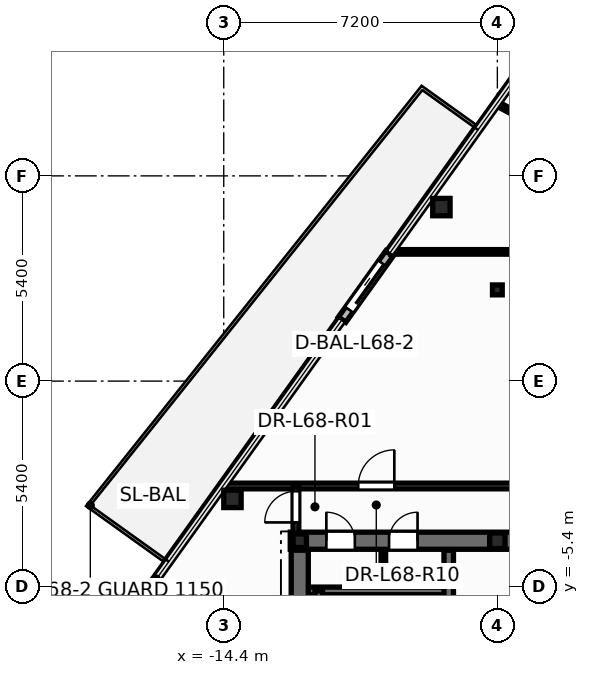
"""IFC4 building model, lengths in metres.
Left out: names, types, materials, properties, quantities, classifications, styles, units other than length and angle.
Written with IfcOpenShell. Run it as: python <this file> out.ifc"""

import sys

from ifc_helpers import new_model, si_unit, direction, frame, frame_2d, origin, origin_2d, place, context, subcontext, project, spatial, rectangle, hollow_circle, i_section, extrude, element, fill, save


model = new_model("IFC4")
c1 = context("Model", 3, precision=1e-05, world=origin(), true_north=direction((0.0, 1.0)))
c2 = subcontext(c1, "Body", "Model", "MODEL_VIEW")
j1 = project(units=[si_unit("LENGTHUNIT", "METRE"), si_unit("PLANEANGLEUNIT", "RADIAN")], contexts=[c1])
p1 = place(None, origin())
s1 = spatial("IfcSite", under=j1, at=p1, CompositionType="ELEMENT")
p2 = place(p1, origin())
s2 = spatial("IfcBuilding", under=s1, at=p2, CompositionType="ELEMENT")
p3 = place(p2, frame((0.0, 0.0, 259.8)))
s3 = spatial("IfcBuildingStorey", under=s2, at=p3, CompositionType="ELEMENT", Elevation=259.8)
for number, where, z_axis, x_axis in (
    (1, (-8.673, 4.579, 0.0), (0.0, 0.0, 1.0), (1.0, 0.0, 0.0)),
    (2, (-14.171, -3.099, 0.0), (0.0, 0.0, 1.0), (1.0, 0.0, 0.0)),
):
    element("IfcColumn", number, at=place(p3, frame(where, z_axis=z_axis, x_axis=x_axis)), inside=s3, PredefinedType="COLUMN", context=c2, shape_type="SweptSolid", body=[
        extrude(hollow_circle(Radius=0.229, WallThickness=0.016, at=origin_2d()), origin(), (0.0, 0.0, 1.0), 3.6),
    ])
p4 = place(p3, frame((-12.4, -4.2, 0.0), z_axis=(0.0, 0.0, 1.0), x_axis=(1.0, 0.0, 0.0)))
e3 = element("IfcColumn", 3, at=p4, inside=s3, PredefinedType="COLUMN", context=c2, shape_type="SweptSolid", body=[
    extrude(i_section(OverallWidth=0.352, OverallDepth=0.359, WebThickness=0.018, FlangeThickness=0.026, at=origin_2d()), origin(), (0.0, 0.0, 1.0), 3.6),
])
p5 = place(p3, frame((-7.2, -4.2, 0.0), z_axis=(0.0, 0.0, 1.0), x_axis=(1.0, 0.0, 0.0)))
e4 = element("IfcColumn", 4, at=p5, inside=s3, PredefinedType="PILASTER", context=c2, shape_type="SweptSolid", body=[
    extrude(i_section(OverallWidth=0.405, OverallDepth=0.414, WebThickness=0.022, FlangeThickness=0.032, at=origin_2d()), origin(), (0.0, 0.0, 1.0), 3.6),
])
p6 = place(p3, frame((-7.2, 2.4, 0.0), z_axis=(0.0, 0.0, 1.0), x_axis=(1.0, 0.0, 0.0)))
e5 = element("IfcColumn", 5, at=p6, inside=s3, PredefinedType="COLUMN", context=c2, shape_type="SweptSolid", body=[
    extrude(i_section(OverallWidth=0.256, OverallDepth=0.26, WebThickness=0.01, FlangeThickness=0.017, at=origin_2d()), origin(), (0.0, 0.0, 1.0), 3.6),
])
p7 = place(p3, frame((-10.039, 3.357, -0.015), z_axis=(0.0, 0.0, 1.0), x_axis=(-0.58216589686, -0.813070026832, 0.0)))
e6 = element("IfcWall", 6, at=p7, inside=s3, PredefinedType="STANDARD", context=c2, shape_type="SweptSolid", body=[
    extrude(rectangle(XDim=2.14, YDim=0.24, at=frame_2d((1.07, 0.0))), origin(), (0.0, 0.0, 1.0), 2.878),
])
p8 = place(p7, frame((0.32, 0.0, 0.015)))
e7 = element("IfcOpeningElement", 7, at=p8, cuts=e6, PredefinedType="OPENING", context=c2, shape_type="SweptSolid", body=[
    extrude(rectangle(XDim=1.506, YDim=2.204, at=frame_2d((0.75, 1.102))), frame((0.0, 0.13, 0.0), z_axis=(0.0, -1.0, 0.0), x_axis=(1.0, 0.0, 0.0)), (0.0, 0.0, 1.0), 0.26),
])
p9 = place(p3, frame((-10.2, -5.52, 0.0), z_axis=(0.0, 0.0, 1.0), x_axis=(0.0, 1.0, 0.0)))
e8 = element("IfcWall", 8, at=p9, inside=s3, PredefinedType="PARTITIONING", context=c2, shape_type="SweptSolid", body=[
    extrude(rectangle(XDim=1.12, YDim=0.12, at=frame_2d((0.56, 0.0))), origin(), (0.0, 0.0, 1.0), 3.345),
])
p10 = place(p3, frame((-12.65, -4.2, 0.0), z_axis=(0.0, 0.0, 1.0), x_axis=(1.0, 0.0, 0.0)))
e9 = element("IfcWall", 9, at=p10, inside=s3, PredefinedType="SHEAR", context=c2, shape_type="SweptSolid", body=[
    extrude(rectangle(XDim=25.3, YDim=0.45, at=frame_2d((12.65, 0.0))), origin(), (0.0, 0.0, 1.0), 3.6),
])
p11 = place(p10, frame((0.95, 0.0, 0.0)))
e10 = element("IfcOpeningElement", 10, at=p11, cuts=e9, PredefinedType="OPENING", context=c2, shape_type="SweptSolid", body=[
    extrude(rectangle(XDim=0.756, YDim=2.054, at=frame_2d((0.375, 1.027))), frame((0.0, 0.235, 0.0), z_axis=(0.0, -1.0, 0.0), x_axis=(1.0, 0.0, 0.0)), (0.0, 0.0, 1.0), 0.47),
])
p12 = place(p10, frame((2.6, 0.0, 0.0)))
e11 = element("IfcOpeningElement", 11, at=p12, cuts=e9, PredefinedType="OPENING", context=c2, shape_type="SweptSolid", body=[
    extrude(rectangle(XDim=0.756, YDim=2.054, at=frame_2d((0.375, 1.027))), frame((0.0, 0.235, 0.0), z_axis=(0.0, -1.0, 0.0), x_axis=(1.0, 0.0, 0.0)), (0.0, 0.0, 1.0), 0.47),
])
p13 = place(p10, frame((21.85, 0.0, 0.0)))
e12 = element("IfcOpeningElement", 12, at=p13, cuts=e9, PredefinedType="OPENING", context=c2, shape_type="SweptSolid", body=[
    extrude(rectangle(XDim=0.756, YDim=2.054, at=frame_2d((0.375, 1.027))), frame((0.0, 0.235, 0.0), z_axis=(0.0, -1.0, 0.0), x_axis=(1.0, 0.0, 0.0)), (0.0, 0.0, 1.0), 0.47),
])
p14 = place(p10, frame((23.5, 0.0, 0.0)))
e13 = element("IfcOpeningElement", 13, at=p14, cuts=e9, PredefinedType="OPENING", context=c2, shape_type="SweptSolid", body=[
    extrude(rectangle(XDim=0.756, YDim=2.054, at=frame_2d((0.375, 1.027))), frame((0.0, 0.235, 0.0), z_axis=(0.0, -1.0, 0.0), x_axis=(1.0, 0.0, 0.0)), (0.0, 0.0, 1.0), 0.47),
])
p15 = place(p10, frame((5.85, 0.0, 0.0)))
e14 = element("IfcOpeningElement", 14, at=p15, cuts=e9, PredefinedType="OPENING", context=c2, shape_type="SweptSolid", body=[
    extrude(rectangle(XDim=1.006, YDim=2.104, at=frame_2d((0.5, 1.052))), frame((0.0, 0.235, 0.0), z_axis=(0.0, -1.0, 0.0), x_axis=(1.0, 0.0, 0.0)), (0.0, 0.0, 1.0), 0.47),
])
p16 = place(p10, frame((10.35, 0.0, 0.0)))
e15 = element("IfcOpeningElement", 15, at=p16, cuts=e9, PredefinedType="OPENING", context=c2, shape_type="SweptSolid", body=[
    extrude(rectangle(XDim=1.406, YDim=2.154, at=frame_2d((0.7, 1.077))), frame((0.0, 0.235, 0.0), z_axis=(0.0, -1.0, 0.0), x_axis=(1.0, 0.0, 0.0)), (0.0, 0.0, 1.0), 0.47),
])
p17 = place(p10, frame((18.45, 0.0, 0.0)))
e16 = element("IfcOpeningElement", 16, at=p17, cuts=e9, PredefinedType="OPENING", context=c2, shape_type="SweptSolid", body=[
    extrude(rectangle(XDim=1.006, YDim=2.104, at=frame_2d((0.5, 1.052))), frame((0.0, 0.235, 0.0), z_axis=(0.0, -1.0, 0.0), x_axis=(1.0, 0.0, 0.0)), (0.0, 0.0, 1.0), 0.47),
])
p18 = place(p3, frame((-12.35, -5.52, 0.0), z_axis=(0.0, 0.0, 1.0), x_axis=(1.0, 0.0, 0.0)))
e17 = element("IfcWall", 17, at=p18, inside=s3, PredefinedType="SOLIDWALL", context=c2, shape_type="SweptSolid", body=[
    extrude(rectangle(XDim=3.87, YDim=0.2, at=frame_2d((1.935, 0.0))), origin(), (0.0, 0.0, 1.0), 3.6),
])
p19 = place(p3, frame((-11.9, -13.1, 0.0), z_axis=(0.0, 0.0, 1.0), x_axis=(0.0, 1.0, 0.0)))
e18 = element("IfcWall", 18, at=p19, inside=s3, PredefinedType="SOLIDWALL", context=c2, shape_type="SweptSolid", body=[
    extrude(rectangle(XDim=7.58, YDim=0.2, at=frame_2d((3.79, 0.0))), origin(), (0.0, 0.0, 1.0), 3.6),
])
p20 = place(p3, frame((-8.48, -13.85, 0.0), z_axis=(0.0, 0.0, 1.0), x_axis=(0.0, 1.0, 0.0)))
e19 = element("IfcWall", 19, at=p20, inside=s3, PredefinedType="SHEAR", context=c2, shape_type="SweptSolid", body=[
    extrude(rectangle(XDim=9.4, YDim=0.25, at=frame_2d((4.7, 0.0))), origin(), (0.0, 0.0, 1.0), 3.6),
])
p21 = place(p20, frame((6.95, 0.0, 0.0)))
e20 = element("IfcOpeningElement", 20, at=p21, cuts=e19, PredefinedType="OPENING", context=c2, shape_type="SweptSolid", body=[
    extrude(rectangle(XDim=1.006, YDim=2.104, at=frame_2d((0.5, 1.052))), frame((0.0, 0.135, 0.0), z_axis=(0.0, -1.0, 0.0), x_axis=(1.0, 0.0, 0.0)), (0.0, 0.0, 1.0), 0.27),
])
p22 = place(p3, frame((-12.4, -13.85, 0.0), z_axis=(0.0, 0.0, 1.0), x_axis=(0.0, 1.0, 0.0)))
e21 = element("IfcWall", 21, at=p22, inside=s3, PredefinedType="SHEAR", context=c2, shape_type="SweptSolid", body=[
    extrude(rectangle(XDim=9.4, YDim=0.45, at=frame_2d((4.7, 0.0))), origin(), (0.0, 0.0, 1.0), 3.6),
])
p23 = place(p3, frame((-14.42, -2.76, 0.0), z_axis=(0.0, 0.0, 1.0), x_axis=(1.0, 0.0, 0.0)))
e22 = element("IfcWall", 22, at=p23, inside=s3, PredefinedType="PARTITIONING", context=c2, shape_type="SweptSolid", body=[
    extrude(rectangle(XDim=15.06, YDim=0.15, at=frame_2d((7.53, 0.0))), origin(), (0.0, 0.0, 1.0), 2.32),
])
p24 = place(p23, frame((3.559, 0.0, 0.0)))
e23 = element("IfcOpeningElement", 23, at=p24, cuts=e22, PredefinedType="OPENING", context=c2, shape_type="SweptSolid", body=[
    extrude(rectangle(XDim=0.956, YDim=2.104, at=frame_2d((0.475, 1.052))), frame((0.0, 0.085, 0.0), z_axis=(0.0, -1.0, 0.0), x_axis=(1.0, 0.0, 0.0)), (0.0, 0.0, 1.0), 0.17),
])
p25 = place(p3, frame((-10.009, 3.4, 0.0), z_axis=(0.0, 0.0, 1.0), x_axis=(1.0, 0.0, 0.0)))
e24 = element("IfcWall", 24, at=p25, inside=s3, PredefinedType="PARTITIONING", context=c2, shape_type="SweptSolid", body=[
    extrude(rectangle(XDim=10.649, YDim=0.12, at=frame_2d((5.324, 0.0))), origin(), (0.0, 0.0, 1.0), 2.32),
])
p26 = place(p3, frame((-12.5, -4.24, 0.0), z_axis=(0.0, 0.0, 1.0), x_axis=(0.0, 1.0, 0.0)))
e25 = element("IfcWall", 25, at=p26, inside=s3, PredefinedType="PARTITIONING", context=c2, shape_type="SweptSolid", body=[
    extrude(rectangle(XDim=1.48, YDim=0.15, at=frame_2d((0.74, 0.0))), origin(), (0.0, 0.0, 1.0), 2.32),
])
p27 = place(p26, frame((0.522, 0.0, 0.0)))
e26 = element("IfcOpeningElement", 26, at=p27, cuts=e25, PredefinedType="OPENING", context=c2, shape_type="SweptSolid", body=[
    extrude(rectangle(XDim=0.826, YDim=2.104, at=frame_2d((0.41, 1.052))), frame((0.0, 0.085, 0.0), z_axis=(0.0, -1.0, 0.0), x_axis=(1.0, 0.0, 0.0)), (0.0, 0.0, 1.0), 0.17),
])
p28 = place(p3, frame((-16.249, -5.332, 0.0), z_axis=(0.0, 0.0, 1.0), x_axis=(0.733563468534, -0.679620951437, 0.0)))
e27 = element("IfcWall", 27, at=p28, inside=s3, PredefinedType="PARTITIONING", context=c2, shape_type="SweptSolid", body=[
    extrude(rectangle(XDim=0.892, YDim=0.12, at=frame_2d((0.446, 0.0))), origin(), (0.0, 0.0, 1.0), 2.863),
])
p29 = place(p3, frame((-6.426, 6.879, 0.0), z_axis=(0.0, 0.0, 1.0), x_axis=(-0.881603040492, 0.47199160903, 0.0)))
e28 = element("IfcWall", 28, at=p29, inside=s3, PredefinedType="PARTITIONING", context=c2, shape_type="SweptSolid", body=[
    extrude(rectangle(XDim=0.885, YDim=0.12, at=frame_2d((0.442, 0.0))), origin(), (0.0, 0.0, 1.0), 2.32),
])
p30 = place(p8, origin())
e29 = element("IfcDoor", 29, at=p30, inside=s3, OperationType="SLIDING_TO_RIGHT", PredefinedType="DOOR", context=c2, shape_type="SweptSolid", body=[
    extrude(rectangle(XDim=1.5, YDim=2.2, at=frame_2d((0.75, 1.1))), frame((0.0, 0.025, 0.0), z_axis=(0.0, -1.0, 0.0), x_axis=(1.0, 0.0, 0.0)), (0.0, 0.0, 1.0), 0.05),
])
fill(e7, e29)
p31 = place(p11, origin())
e30 = element("IfcDoor", 30, at=p31, inside=s3, OperationType="SINGLE_SWING_LEFT", PredefinedType="DOOR", context=c2, shape_type="SweptSolid", body=[
    extrude(rectangle(XDim=0.75, YDim=2.05, at=frame_2d((0.375, 1.025))), frame((0.0, 0.025, 0.0), z_axis=(0.0, -1.0, 0.0), x_axis=(1.0, 0.0, 0.0)), (0.0, 0.0, 1.0), 0.05),
])
fill(e10, e30)
p32 = place(p12, origin())
e31 = element("IfcDoor", 31, at=p32, inside=s3, OperationType="SINGLE_SWING_RIGHT", PredefinedType="DOOR", context=c2, shape_type="SweptSolid", body=[
    extrude(rectangle(XDim=0.75, YDim=2.05, at=frame_2d((0.375, 1.025))), frame((0.0, 0.025, 0.0), z_axis=(0.0, -1.0, 0.0), x_axis=(1.0, 0.0, 0.0)), (0.0, 0.0, 1.0), 0.05),
])
fill(e11, e31)
p33 = place(p27, origin())
e32 = element("IfcDoor", 32, at=p33, inside=s3, OperationType="SINGLE_SWING_LEFT", PredefinedType="DOOR", context=c2, shape_type="SweptSolid", body=[
    extrude(rectangle(XDim=0.82, YDim=2.1, at=frame_2d((0.41, 1.05))), frame((0.0, 0.025, 0.0), z_axis=(0.0, -1.0, 0.0), x_axis=(1.0, 0.0, 0.0)), (0.0, 0.0, 1.0), 0.05),
])
fill(e26, e32)
p34 = place(p24, origin())
e33 = element("IfcDoor", 33, at=p34, inside=s3, OperationType="SINGLE_SWING_RIGHT", PredefinedType="DOOR", context=c2, shape_type="SweptSolid", body=[
    extrude(rectangle(XDim=0.95, YDim=2.1, at=frame_2d((0.475, 1.05))), frame((0.0, 0.025, 0.0), z_axis=(0.0, -1.0, 0.0), x_axis=(1.0, 0.0, 0.0)), (0.0, 0.0, 1.0), 0.05),
])
fill(e23, e33)
save(model, sys.argv[1])
